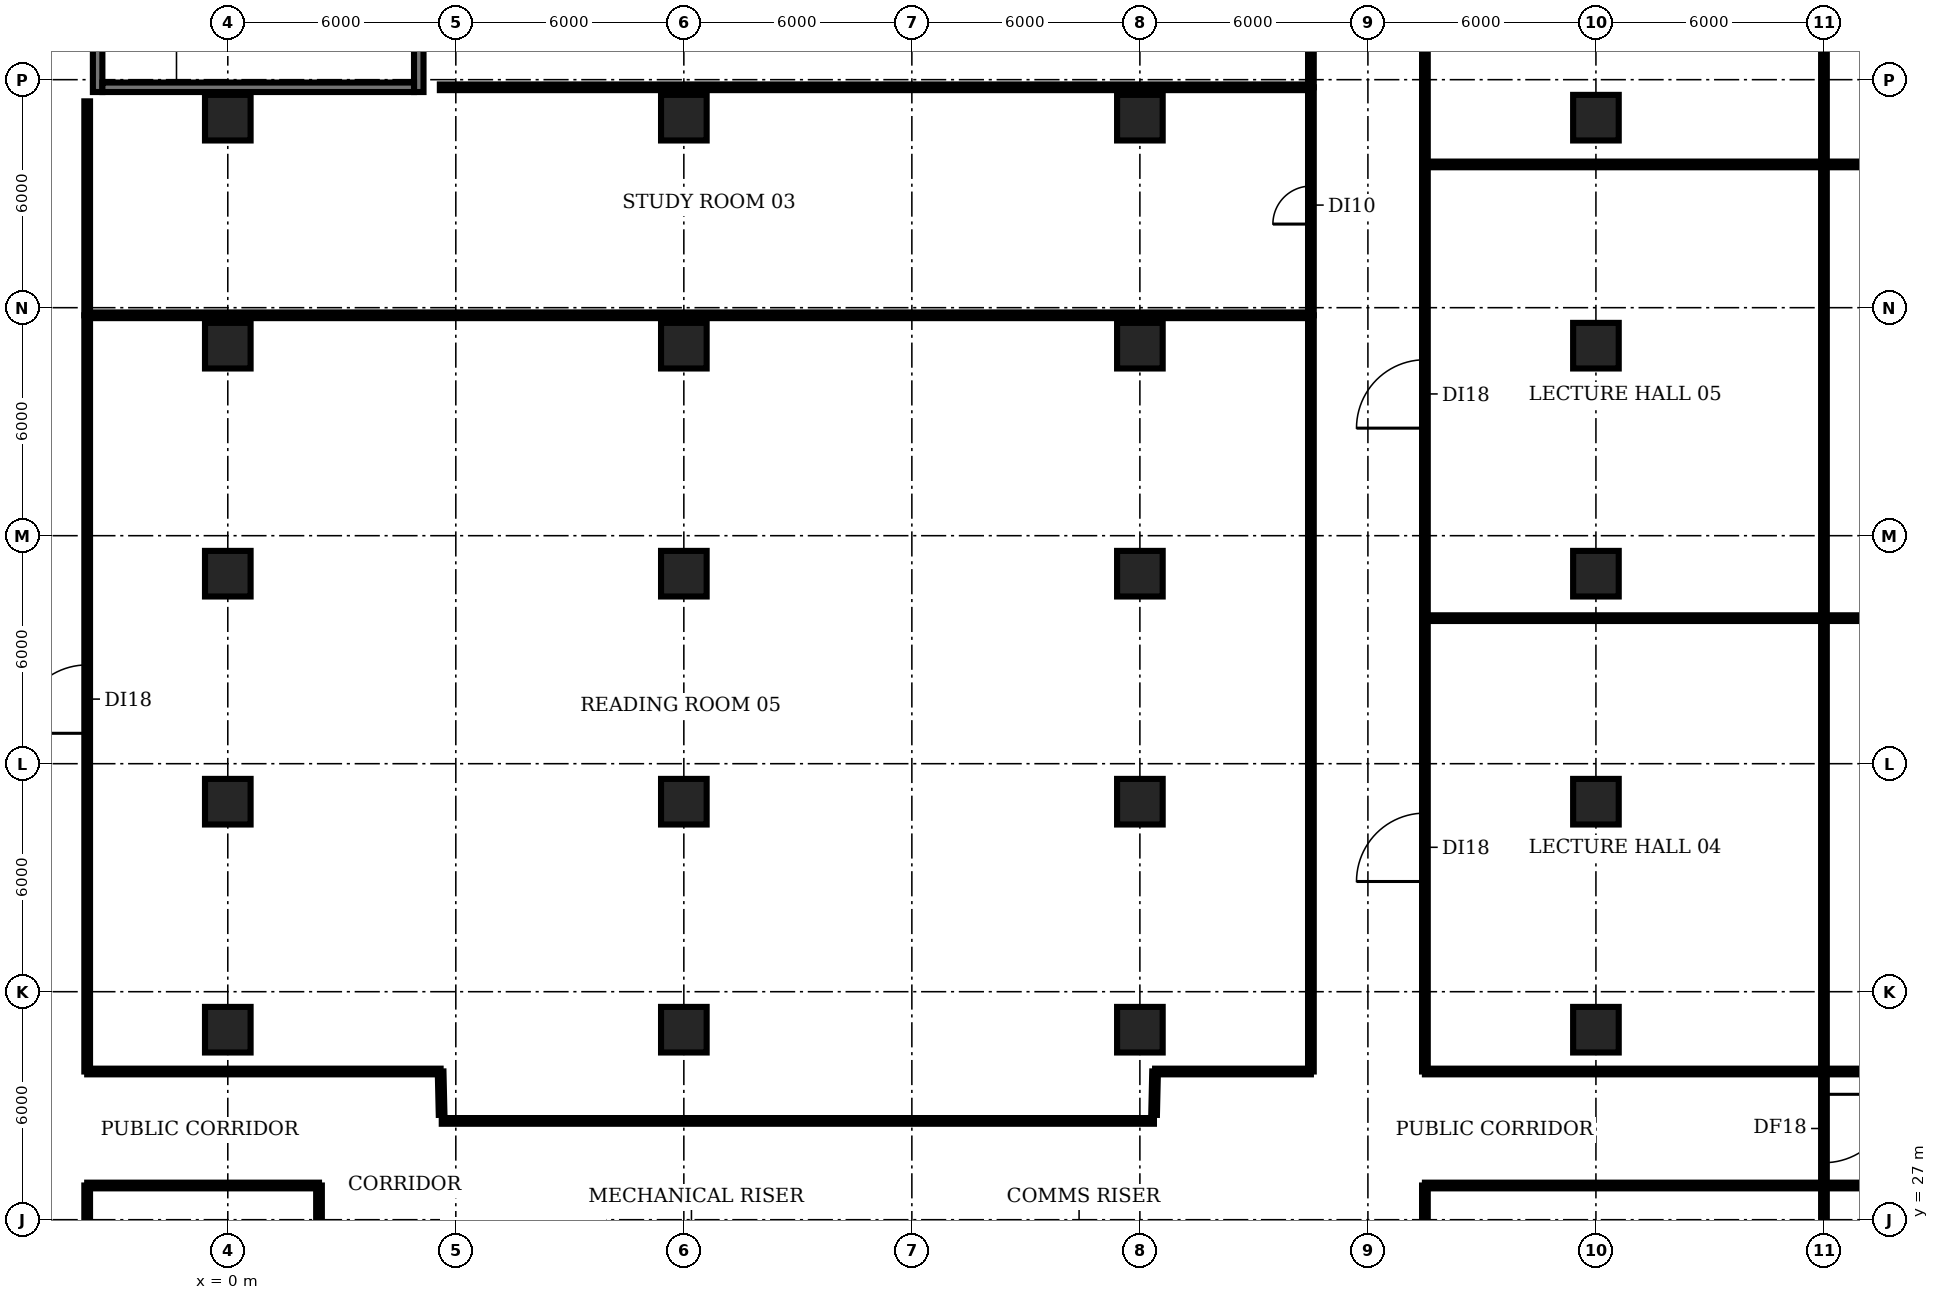
"""IFC4 building model, lengths in metres.
Left out: names, types, materials, properties, quantities, classifications, styles, units other than length and angle.
Written with IfcOpenShell. Run it as: python <this file> out.ifc"""

import sys

from ifc_helpers import new_model, si_unit, direction, frame, frame_2d, origin, origin_2d, place, context, subcontext, project, spatial, rectangle, extrude, element, fill, save


model = new_model("IFC4")
c1 = context("Model", 3, precision=1e-05, world=origin(), true_north=direction((0.0, 1.0)))
c2 = subcontext(c1, "Body", "Model", "MODEL_VIEW")
j1 = project(units=[si_unit("LENGTHUNIT", "METRE"), si_unit("PLANEANGLEUNIT", "RADIAN")], contexts=[c1])
p1 = place(None, origin())
s1 = spatial("IfcSite", under=j1, at=p1, CompositionType="ELEMENT")
p2 = place(p1, origin())
s2 = spatial("IfcBuilding", under=s1, at=p2, CompositionType="ELEMENT")
p3 = place(p2, frame((0.0, 0.0, 6.0)))
s3 = spatial("IfcBuildingStorey", under=s2, at=p3, CompositionType="ELEMENT", Elevation=6.0)
for number, where, z_axis, x_axis in (
    (1, (0.0, 32.0, 0.0), (0.0, 0.0, 1.0), (1.0, 0.0, 0.0)),
    (2, (0.0, 38.0, 0.0), (0.0, 0.0, 1.0), (1.0, 0.0, 0.0)),
    (3, (0.0, 44.0, 0.0), (0.0, 0.0, 1.0), (1.0, 0.0, 0.0)),
    (4, (0.0, 50.0, 0.0), (0.0, 0.0, 1.0), (1.0, 0.0, 0.0)),
    (5, (0.0, 56.0, 0.0), (0.0, 0.0, 1.0), (1.0, 0.0, 0.0)),
    (6, (12.0, 32.0, 0.0), (0.0, 0.0, 1.0), (1.0, 0.0, 0.0)),
    (7, (12.0, 38.0, 0.0), (0.0, 0.0, 1.0), (1.0, 0.0, 0.0)),
    (8, (12.0, 44.0, 0.0), (0.0, 0.0, 1.0), (1.0, 0.0, 0.0)),
    (9, (12.0, 50.0, 0.0), (0.0, 0.0, 1.0), (1.0, 0.0, 0.0)),
    (10, (12.0, 56.0, 0.0), (0.0, 0.0, 1.0), (1.0, 0.0, 0.0)),
    (11, (24.0, 32.0, 0.0), (0.0, 0.0, 1.0), (1.0, 0.0, 0.0)),
    (12, (24.0, 38.0, 0.0), (0.0, 0.0, 1.0), (1.0, 0.0, 0.0)),
    (13, (24.0, 44.0, 0.0), (0.0, 0.0, 1.0), (1.0, 0.0, 0.0)),
    (14, (24.0, 50.0, 0.0), (0.0, 0.0, 1.0), (1.0, 0.0, 0.0)),
    (15, (24.0, 56.0, 0.0), (0.0, 0.0, 1.0), (1.0, 0.0, 0.0)),
    (16, (36.0, 32.0, 0.0), (0.0, 0.0, 1.0), (1.0, 0.0, 0.0)),
    (17, (36.0, 38.0, 0.0), (0.0, 0.0, 1.0), (1.0, 0.0, 0.0)),
    (18, (36.0, 44.0, 0.0), (0.0, 0.0, 1.0), (1.0, 0.0, 0.0)),
    (19, (36.0, 50.0, 0.0), (0.0, 0.0, 1.0), (1.0, 0.0, 0.0)),
    (20, (36.0, 56.0, 0.0), (0.0, 0.0, 1.0), (1.0, 0.0, 0.0)),
):
    element("IfcColumn", number, at=place(p3, frame(where, z_axis=z_axis, x_axis=x_axis)), inside=s3, PredefinedType="COLUMN", context=c2, shape_type="SweptSolid", body=[
        extrude(rectangle(XDim=1.2, YDim=1.2, at=origin_2d()), origin(), (0.0, 0.0, 1.0), 4.6),
    ])
p4 = place(p3, frame((-3.425, 56.675, 0.0), z_axis=(0.0, 0.0, 1.0), x_axis=(0.0, 1.0, 0.0)))
e21 = element("IfcWall", 21, at=p4, inside=s3, PredefinedType="SHEAR", context=c2, shape_type="SweptSolid", body=[
    extrude(rectangle(XDim=4.65, YDim=0.25, at=frame_2d((2.325, 0.0))), origin(), (0.0, 0.0, 1.0), 4.6),
])
p5 = place(p4, frame((1.575, 0.0, 0.0)))
e22 = element("IfcOpeningElement", 22, at=p5, cuts=e21, PredefinedType="OPENING", context=c2, shape_type="SweptSolid", body=[
    extrude(rectangle(XDim=1.5, YDim=2.1, at=frame_2d((0.75, 1.05))), frame((0.0, 0.135, 0.0), z_axis=(0.0, -1.0, 0.0), x_axis=(1.0, 0.0, 0.0)), (0.0, 0.0, 1.0), 0.27),
])
p6 = place(p3, frame((5.025, 56.675, 0.0), z_axis=(0.0, 0.0, 1.0), x_axis=(0.0, 1.0, 0.0)))
e23 = element("IfcWall", 23, at=p6, inside=s3, PredefinedType="SHEAR", context=c2, shape_type="SweptSolid", body=[
    extrude(rectangle(XDim=4.65, YDim=0.25, at=frame_2d((2.325, 0.0))), origin(), (0.0, 0.0, 1.0), 4.6),
])
p7 = place(p3, frame((-3.3, 56.8, 0.0), z_axis=(0.0, 0.0, 1.0), x_axis=(1.0, 0.0, 0.0)))
e24 = element("IfcWall", 24, at=p7, inside=s3, PredefinedType="SHEAR", context=c2, shape_type="SweptSolid", body=[
    extrude(rectangle(XDim=8.2, YDim=0.25, at=frame_2d((4.1, 0.0))), origin(), (0.0, 0.0, 1.0), 4.6),
])
p8 = place(p3, frame((-3.7, 27.9, 0.0), z_axis=(0.0, 0.0, 1.0), x_axis=(0.0, -1.0, 0.0)))
e25 = element("IfcWall", 25, at=p8, inside=s3, PredefinedType="PARTITIONING", context=c2, shape_type="SweptSolid", body=[
    extrude(rectangle(XDim=29.95, YDim=0.15, at=frame_2d((14.975, 0.0))), origin(), (0.0, 0.0, 1.0), 3.18),
])
p9 = place(p8, frame((11.45, 0.0, 0.0)))
e26 = element("IfcOpeningElement", 26, at=p9, cuts=e25, PredefinedType="OPENING", context=c2, shape_type="SweptSolid", body=[
    extrude(rectangle(XDim=0.9, YDim=2.1, at=frame_2d((0.45, 1.05))), frame((0.0, 0.085, 0.0), z_axis=(0.0, -1.0, 0.0), x_axis=(1.0, 0.0, 0.0)), (0.0, 0.0, 1.0), 0.17),
])
p10 = place(p3, frame((-3.7, 27.9, 0.0), z_axis=(0.0, 0.0, 1.0), x_axis=(1.0, 0.0, 0.0)))
e27 = element("IfcWall", 27, at=p10, inside=s3, PredefinedType="PARTITIONING", context=c2, shape_type="SweptSolid", body=[
    extrude(rectangle(XDim=6.1, YDim=0.15, at=frame_2d((3.05, 0.0))), origin(), (0.0, 0.0, 1.0), 3.18),
])
p11 = place(p3, frame((-3.7, 30.9, 0.0), z_axis=(0.0, 0.0, 1.0), x_axis=(0.0, 1.0, 0.0)))
e28 = element("IfcWall", 28, at=p11, inside=s3, PredefinedType="PARTITIONING", context=c2, shape_type="SweptSolid", body=[
    extrude(rectangle(XDim=19.9, YDim=0.15, at=frame_2d((9.95, 0.0))), origin(), (0.0, 0.0, 1.0), 3.18),
])
p12 = place(p11, frame((8.9, 0.0, 0.0)))
e29 = element("IfcOpeningElement", 29, at=p12, cuts=e28, PredefinedType="OPENING", context=c2, shape_type="SweptSolid", body=[
    extrude(rectangle(XDim=1.8, YDim=2.1, at=frame_2d((0.9, 1.05))), frame((0.0, 0.085, 0.0), z_axis=(0.0, -1.0, 0.0), x_axis=(1.0, 0.0, 0.0)), (0.0, 0.0, 1.0), 0.17),
])
p13 = place(p3, frame((-3.7, 30.9, 0.0), z_axis=(0.0, 0.0, 1.0), x_axis=(1.0, 0.0, 0.0)))
e30 = element("IfcWall", 30, at=p13, inside=s3, PredefinedType="PARTITIONING", context=c2, shape_type="SweptSolid", body=[
    extrude(rectangle(XDim=9.3, YDim=0.15, at=frame_2d((4.65, 0.0))), origin(), (0.0, 0.0, 1.0), 3.18),
])
p14 = place(p3, frame((-3.7, 50.8, 0.0), z_axis=(0.0, 0.0, 1.0), x_axis=(0.0, 1.0, 0.0)))
e31 = element("IfcWall", 31, at=p14, inside=s3, PredefinedType="PARTITIONING", context=c2, shape_type="SweptSolid", body=[
    extrude(rectangle(XDim=5.63, YDim=0.15, at=frame_2d((2.815, 0.0))), origin(), (0.0, 0.0, 1.0), 3.18),
])
p15 = place(p3, frame((-3.7, 50.8, 0.0), z_axis=(0.0, 0.0, 1.0), x_axis=(1.0, 0.0, 0.0)))
e32 = element("IfcWall", 32, at=p15, inside=s3, PredefinedType="PARTITIONING", context=c2, shape_type="SweptSolid", body=[
    extrude(rectangle(XDim=32.2, YDim=0.15, at=frame_2d((16.1, 0.0))), origin(), (0.0, 0.0, 1.0), 3.18),
])
p16 = place(p3, frame((2.4, -4.5, 0.0), z_axis=(0.0, 0.0, 1.0), x_axis=(0.0, 1.0, 0.0)))
e33 = element("IfcWall", 33, at=p16, inside=s3, PredefinedType="PARTITIONING", context=c2, shape_type="SweptSolid", body=[
    extrude(rectangle(XDim=32.4, YDim=0.15, at=frame_2d((16.2, 0.0))), origin(), (0.0, 0.0, 1.0), 3.18),
])
p17 = place(p3, frame((5.58, 56.8, 0.0), z_axis=(0.0, 0.0, 1.0), x_axis=(1.0, 0.0, 0.0)))
e34 = element("IfcWall", 34, at=p17, inside=s3, PredefinedType="PARTITIONING", context=c2, shape_type="SweptSolid", body=[
    extrude(rectangle(XDim=22.92, YDim=0.15, at=frame_2d((11.46, 0.0))), origin(), (0.0, 0.0, 1.0), 3.18),
])
p18 = place(p3, frame((5.6, 30.9, 0.0), z_axis=(0.0, 0.0, 1.0), x_axis=(0.022906193834, -0.99973761872, 0.0)))
e35 = element("IfcWall", 35, at=p18, inside=s3, PredefinedType="PARTITIONING", context=c2, shape_type="SweptSolid", body=[
    extrude(rectangle(XDim=1.14, YDim=0.15, at=frame_2d((0.57, 0.0))), origin(), (0.0, 0.0, 1.0), 3.18),
])
p19 = place(p3, frame((5.63, 29.6, 0.0), z_axis=(0.0, 0.0, 1.0), x_axis=(1.0, 0.0, 0.0)))
e36 = element("IfcWall", 36, at=p19, inside=s3, PredefinedType="PARTITIONING", context=c2, shape_type="SweptSolid", body=[
    extrude(rectangle(XDim=18.74, YDim=0.15, at=frame_2d((9.37, 0.0))), origin(), (0.0, 0.0, 1.0), 3.18),
])
p20 = place(p3, frame((24.374, 29.76, 0.0), z_axis=(0.0, 0.0, 1.0), x_axis=(0.022906193834, 0.99973761872, 0.0)))
e37 = element("IfcWall", 37, at=p20, inside=s3, PredefinedType="PARTITIONING", context=c2, shape_type="SweptSolid", body=[
    extrude(rectangle(XDim=1.14, YDim=0.15, at=frame_2d((0.57, 0.0))), origin(), (0.0, 0.0, 1.0), 3.18),
])
p21 = place(p3, frame((24.4, 30.9, 0.0), z_axis=(0.0, 0.0, 1.0), x_axis=(1.0, 0.0, 0.0)))
e38 = element("IfcWall", 38, at=p21, inside=s3, PredefinedType="PARTITIONING", context=c2, shape_type="SweptSolid", body=[
    extrude(rectangle(XDim=4.1, YDim=0.15, at=frame_2d((2.05, 0.0))), origin(), (0.0, 0.0, 1.0), 3.18),
])
p22 = place(p3, frame((28.5, 30.9, 0.0), z_axis=(0.0, 0.0, 1.0), x_axis=(0.0, 1.0, 0.0)))
e39 = element("IfcWall", 39, at=p22, inside=s3, PredefinedType="PARTITIONING", context=c2, shape_type="SweptSolid", body=[
    extrude(rectangle(XDim=19.9, YDim=0.15, at=frame_2d((9.95, 0.0))), origin(), (0.0, 0.0, 1.0), 3.18),
])
p23 = place(p3, frame((28.5, 50.8, 0.0), z_axis=(0.0, 0.0, 1.0), x_axis=(0.0, 1.0, 0.0)))
e40 = element("IfcWall", 40, at=p23, inside=s3, PredefinedType="PARTITIONING", context=c2, shape_type="SweptSolid", body=[
    extrude(rectangle(XDim=6.0, YDim=0.15, at=frame_2d((3.0, 0.0))), origin(), (0.0, 0.0, 1.0), 3.18),
])
p24 = place(p23, frame((2.4, 0.0, 0.0)))
e41 = element("IfcOpeningElement", 41, at=p24, cuts=e40, PredefinedType="OPENING", context=c2, shape_type="SweptSolid", body=[
    extrude(rectangle(XDim=1.0, YDim=2.1, at=frame_2d((0.5, 1.05))), frame((0.0, 0.085, 0.0), z_axis=(0.0, -1.0, 0.0), x_axis=(1.0, 0.0, 0.0)), (0.0, 0.0, 1.0), 0.17),
])
p25 = place(p3, frame((28.5, 56.8, 0.0), z_axis=(0.0, 0.0, 1.0), x_axis=(0.0, 1.0, 0.0)))
e42 = element("IfcWall", 42, at=p25, inside=s3, PredefinedType="PARTITIONING", context=c2, shape_type="SweptSolid", body=[
    extrude(rectangle(XDim=4.4, YDim=0.15, at=frame_2d((2.2, 0.0))), origin(), (0.0, 0.0, 1.0), 3.18),
])
p26 = place(p25, frame((1.7, 0.0, 0.0)))
e43 = element("IfcOpeningElement", 43, at=p26, cuts=e42, PredefinedType="OPENING", context=c2, shape_type="SweptSolid", body=[
    extrude(rectangle(XDim=1.0, YDim=2.1, at=frame_2d((0.5, 1.05))), frame((0.0, 0.085, 0.0), z_axis=(0.0, -1.0, 0.0), x_axis=(1.0, 0.0, 0.0)), (0.0, 0.0, 1.0), 0.17),
])
p27 = place(p3, frame((31.5, 19.52, 0.0), z_axis=(0.0, 0.0, 1.0), x_axis=(0.0, 1.0, 0.0)))
e44 = element("IfcWall", 44, at=p27, inside=s3, PredefinedType="PARTITIONING", context=c2, shape_type="SweptSolid", body=[
    extrude(rectangle(XDim=8.38, YDim=0.15, at=frame_2d((4.19, 0.0))), origin(), (0.0, 0.0, 1.0), 3.18),
])
p28 = place(p3, frame((31.5, 27.9, 0.0), z_axis=(0.0, 0.0, 1.0), x_axis=(1.0, 0.0, 0.0)))
e45 = element("IfcWall", 45, at=p28, inside=s3, PredefinedType="PARTITIONING", context=c2, shape_type="SweptSolid", body=[
    extrude(rectangle(XDim=21.0, YDim=0.15, at=frame_2d((10.5, 0.0))), origin(), (0.0, 0.0, 1.0), 3.18),
])
p29 = place(p3, frame((31.5, 30.9, 0.0), z_axis=(0.0, 0.0, 1.0), x_axis=(0.0, 1.0, 0.0)))
e46 = element("IfcWall", 46, at=p29, inside=s3, PredefinedType="PARTITIONING", context=c2, shape_type="SweptSolid", body=[
    extrude(rectangle(XDim=11.93, YDim=0.15, at=frame_2d((5.965, 0.0))), origin(), (0.0, 0.0, 1.0), 3.18),
])
p30 = place(p29, frame((5.0, 0.0, 0.0)))
e47 = element("IfcOpeningElement", 47, at=p30, cuts=e46, PredefinedType="OPENING", context=c2, shape_type="SweptSolid", body=[
    extrude(rectangle(XDim=1.8, YDim=2.1, at=frame_2d((0.9, 1.05))), frame((0.0, 0.085, 0.0), z_axis=(0.0, -1.0, 0.0), x_axis=(1.0, 0.0, 0.0)), (0.0, 0.0, 1.0), 0.17),
])
p31 = place(p3, frame((31.5, 30.9, 0.0), z_axis=(0.0, 0.0, 1.0), x_axis=(1.0, 0.0, 0.0)))
e48 = element("IfcWall", 48, at=p31, inside=s3, PredefinedType="PARTITIONING", context=c2, shape_type="SweptSolid", body=[
    extrude(rectangle(XDim=21.0, YDim=0.15, at=frame_2d((10.5, 0.0))), origin(), (0.0, 0.0, 1.0), 3.18),
])
p32 = place(p3, frame((31.5, 42.83, 0.0), z_axis=(0.0, 0.0, 1.0), x_axis=(0.0, 1.0, 0.0)))
e49 = element("IfcWall", 49, at=p32, inside=s3, PredefinedType="PARTITIONING", context=c2, shape_type="SweptSolid", body=[
    extrude(rectangle(XDim=11.94, YDim=0.15, at=frame_2d((5.97, 0.0))), origin(), (0.0, 0.0, 1.0), 3.18),
])
p33 = place(p32, frame((5.0, 0.0, 0.0)))
e50 = element("IfcOpeningElement", 50, at=p33, cuts=e49, PredefinedType="OPENING", context=c2, shape_type="SweptSolid", body=[
    extrude(rectangle(XDim=1.8, YDim=2.1, at=frame_2d((0.9, 1.05))), frame((0.0, 0.085, 0.0), z_axis=(0.0, -1.0, 0.0), x_axis=(1.0, 0.0, 0.0)), (0.0, 0.0, 1.0), 0.17),
])
p34 = place(p3, frame((31.5, 42.83, 0.0), z_axis=(0.0, 0.0, 1.0), x_axis=(1.0, 0.0, 0.0)))
e51 = element("IfcWall", 51, at=p34, inside=s3, PredefinedType="PARTITIONING", context=c2, shape_type="SweptSolid", body=[
    extrude(rectangle(XDim=21.0, YDim=0.15, at=frame_2d((10.5, 0.0))), origin(), (0.0, 0.0, 1.0), 3.18),
])
p35 = place(p3, frame((31.5, 54.77, 0.0), z_axis=(0.0, 0.0, 1.0), x_axis=(0.0, 1.0, 0.0)))
e52 = element("IfcWall", 52, at=p35, inside=s3, PredefinedType="PARTITIONING", context=c2, shape_type="SweptSolid", body=[
    extrude(rectangle(XDim=11.93, YDim=0.15, at=frame_2d((5.965, 0.0))), origin(), (0.0, 0.0, 1.0), 3.18),
])
p36 = place(p35, frame((5.0, 0.0, 0.0)))
e53 = element("IfcOpeningElement", 53, at=p36, cuts=e52, PredefinedType="OPENING", context=c2, shape_type="SweptSolid", body=[
    extrude(rectangle(XDim=1.8, YDim=2.1, at=frame_2d((0.9, 1.05))), frame((0.0, 0.085, 0.0), z_axis=(0.0, -1.0, 0.0), x_axis=(1.0, 0.0, 0.0)), (0.0, 0.0, 1.0), 0.17),
])
p37 = place(p3, frame((31.5, 54.77, 0.0), z_axis=(0.0, 0.0, 1.0), x_axis=(1.0, 0.0, 0.0)))
e54 = element("IfcWall", 54, at=p37, inside=s3, PredefinedType="PARTITIONING", context=c2, shape_type="SweptSolid", body=[
    extrude(rectangle(XDim=21.0, YDim=0.15, at=frame_2d((10.5, 0.0))), origin(), (0.0, 0.0, 1.0), 3.18),
])
p38 = place(p3, frame((42.0, -4.5, 0.0), z_axis=(0.0, 0.0, 1.0), x_axis=(0.0, 1.0, 0.0)))
e55 = element("IfcWall", 55, at=p38, inside=s3, PredefinedType="PARTITIONING", context=c2, shape_type="SweptSolid", body=[
    extrude(rectangle(XDim=32.4, YDim=0.15, at=frame_2d((16.2, 0.0))), origin(), (0.0, 0.0, 1.0), 3.18),
])
p39 = place(p3, frame((42.0, 30.9, 0.0), z_axis=(0.0, 0.0, 1.0), x_axis=(0.0, -1.0, 0.0)))
e56 = element("IfcWall", 56, at=p39, inside=s3, PredefinedType="PARTITIONING", context=c2, shape_type="SweptSolid", body=[
    extrude(rectangle(XDim=3.0, YDim=0.15, at=frame_2d((1.5, 0.0))), origin(), (0.0, 0.0, 1.0), 3.18),
])
p40 = place(p39, frame((0.6, 0.0, 0.0)))
e57 = element("IfcOpeningElement", 57, at=p40, cuts=e56, PredefinedType="OPENING", context=c2, shape_type="SweptSolid", body=[
    extrude(rectangle(XDim=1.8, YDim=2.1, at=frame_2d((0.9, 1.05))), frame((0.0, 0.085, 0.0), z_axis=(0.0, -1.0, 0.0), x_axis=(1.0, 0.0, 0.0)), (0.0, 0.0, 1.0), 0.17),
])
p41 = place(p3, frame((42.0, 30.9, 0.0), z_axis=(0.0, 0.0, 1.0), x_axis=(0.0, 1.0, 0.0)))
e58 = element("IfcWall", 58, at=p41, inside=s3, PredefinedType="PARTITIONING", context=c2, shape_type="SweptSolid", body=[
    extrude(rectangle(XDim=31.58, YDim=0.15, at=frame_2d((15.79, 0.0))), origin(), (0.0, 0.0, 1.0), 3.18),
])
p42 = place(p12, origin())
e59 = element("IfcDoor", 59, at=p42, inside=s3, OperationType="SINGLE_SWING_LEFT", PredefinedType="DOOR", context=c2, shape_type="SweptSolid", body=[
    extrude(rectangle(XDim=1.8, YDim=2.1, at=frame_2d((0.9, 1.05))), frame((0.0, 0.025, 0.0), z_axis=(0.0, -1.0, 0.0), x_axis=(1.0, 0.0, 0.0)), (0.0, 0.0, 1.0), 0.05),
])
fill(e29, e59)
p43 = place(p24, origin())
e60 = element("IfcDoor", 60, at=p43, inside=s3, OperationType="SINGLE_SWING_LEFT", PredefinedType="DOOR", context=c2, shape_type="SweptSolid", body=[
    extrude(rectangle(XDim=1.0, YDim=2.1, at=frame_2d((0.5, 1.05))), frame((0.0, 0.025, 0.0), z_axis=(0.0, -1.0, 0.0), x_axis=(1.0, 0.0, 0.0)), (0.0, 0.0, 1.0), 0.05),
])
fill(e41, e60)
p44 = place(p30, origin())
e61 = element("IfcDoor", 61, at=p44, inside=s3, OperationType="SINGLE_SWING_LEFT", PredefinedType="DOOR", context=c2, shape_type="SweptSolid", body=[
    extrude(rectangle(XDim=1.8, YDim=2.1, at=frame_2d((0.9, 1.05))), frame((0.0, 0.025, 0.0), z_axis=(0.0, -1.0, 0.0), x_axis=(1.0, 0.0, 0.0)), (0.0, 0.0, 1.0), 0.05),
])
fill(e47, e61)
p45 = place(p33, origin())
e62 = element("IfcDoor", 62, at=p45, inside=s3, OperationType="SINGLE_SWING_LEFT", PredefinedType="DOOR", context=c2, shape_type="SweptSolid", body=[
    extrude(rectangle(XDim=1.8, YDim=2.1, at=frame_2d((0.9, 1.05))), frame((0.0, 0.025, 0.0), z_axis=(0.0, -1.0, 0.0), x_axis=(1.0, 0.0, 0.0)), (0.0, 0.0, 1.0), 0.05),
])
fill(e50, e62)
p46 = place(p40, origin())
e63 = element("IfcDoor", 63, at=p46, inside=s3, OperationType="SINGLE_SWING_LEFT", PredefinedType="DOOR", context=c2, shape_type="SweptSolid", body=[
    extrude(rectangle(XDim=1.8, YDim=2.1, at=frame_2d((0.9, 1.05))), frame((0.0, 0.025, 0.0), z_axis=(0.0, -1.0, 0.0), x_axis=(1.0, 0.0, 0.0)), (0.0, 0.0, 1.0), 0.05),
])
fill(e57, e63)
save(model, sys.argv[1])
